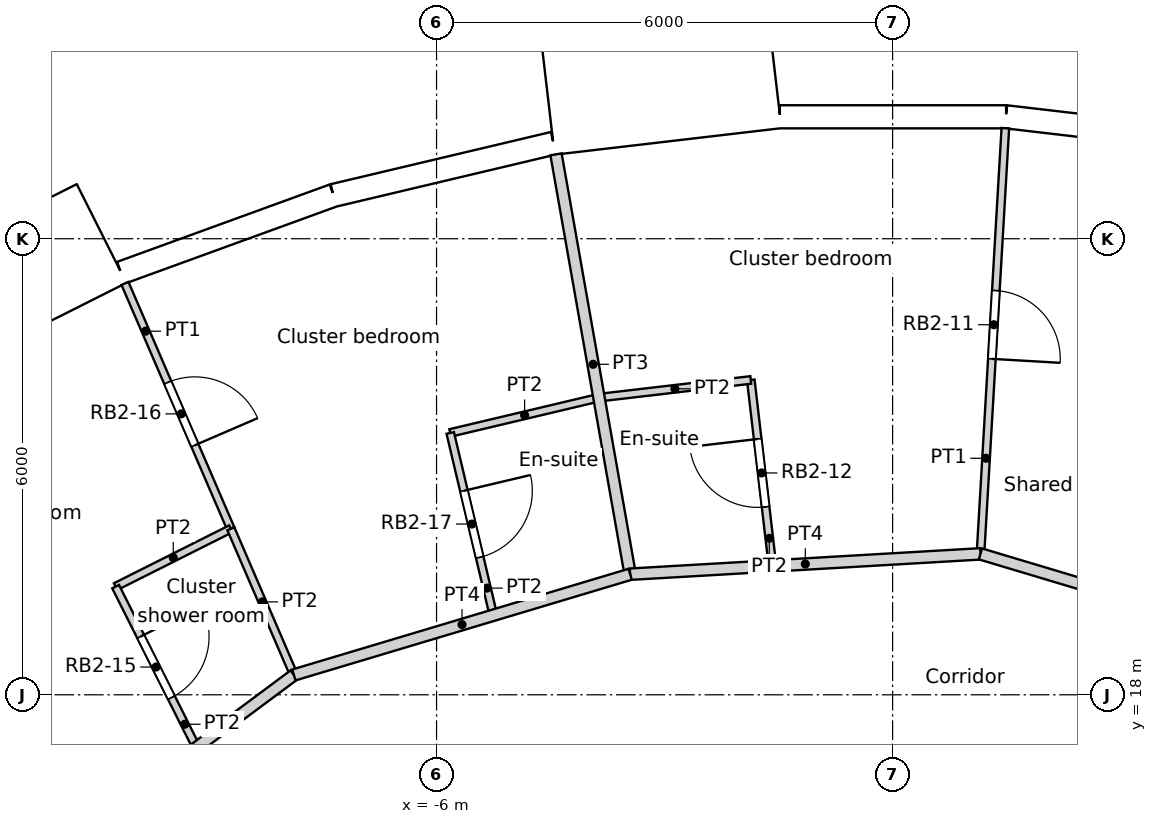
"""IFC4 building model, lengths in metres.
Left out: names, types, materials, properties, quantities, classifications, styles, units other than length and angle.
Written with IfcOpenShell. Run it as: python <this file> out.ifc"""

import sys

from ifc_helpers import new_model, si_unit, direction, frame, frame_2d, origin, origin_2d, place, context, subcontext, project, spatial, rectangle, circle, extrude, element, fill, save


model = new_model("IFC4")
c1 = context("Model", 3, precision=1e-05, world=origin(), true_north=direction((0.0, 1.0)))
c2 = subcontext(c1, "Body", "Model", "MODEL_VIEW")
j1 = project(units=[si_unit("LENGTHUNIT", "METRE"), si_unit("PLANEANGLEUNIT", "RADIAN")], contexts=[c1])
p1 = place(None, origin())
s1 = spatial("IfcSite", under=j1, at=p1, CompositionType="ELEMENT")
p2 = place(p1, origin())
s2 = spatial("IfcBuilding", under=s1, at=p2, CompositionType="ELEMENT")
p3 = place(p2, frame((0.0, 0.0, 136.8)))
s3 = spatial("IfcBuildingStorey", under=s2, at=p3, CompositionType="ELEMENT", Elevation=136.8)
for number, where, z_axis, x_axis in (
    (1, (-1.427, 24.506, 0.0), (0.0, 0.0, 1.0), (1.0, 0.0, 0.0)),
    (2, (-7.04, 23.516, 0.0), (0.0, 0.0, 1.0), (1.0, 0.0, 0.0)),
):
    element("IfcColumn", number, at=place(p3, frame(where, z_axis=z_axis, x_axis=x_axis)), inside=s3, PredefinedType="COLUMN", context=c2, shape_type="SweptSolid", body=[
        extrude(circle(Radius=0.6, at=origin_2d()), origin(), (0.0, 0.0, 1.0), 3.6),
    ])
for number, where, z_axis, x_axis in (
    (3, (1.406, 18.77, 0.0), (0.0, 0.0, 1.0), (1.0, 0.0, 0.0)),
    (4, (-4.188, 18.35, 0.0), (0.0, 0.0, 1.0), (1.0, 0.0, 0.0)),
):
    element("IfcColumn", number, at=place(p3, frame(where, z_axis=z_axis, x_axis=x_axis)), inside=s3, PredefinedType="COLUMN", context=c2, shape_type="SweptSolid", body=[
        extrude(circle(Radius=0.65, at=origin_2d()), origin(), (0.0, 0.0, 1.0), 3.6),
    ])
p4 = place(p3, frame((4.444, 25.259, 0.0), z_axis=(0.0, 0.0, 1.0), x_axis=(-0.993245010522, 0.1160359818, 0.0)))
e5 = element("IfcWall", 5, at=p4, inside=s3, PredefinedType="SOLIDWALL", context=c2, shape_type="SweptSolid", body=[
    extrude(rectangle(XDim=2.973, YDim=0.3, at=frame_2d((1.486, 0.0))), origin(), (0.0, 0.0, 1.0), 2.8),
])
p5 = place(p4, frame((1.486, 0.0, 1.55)))
e6 = element("IfcOpeningElement", 6, at=p5, cuts=e5, PredefinedType="OPENING", context=c2, shape_type="SweptSolid", body=[
    extrude(circle(Radius=0.9, at=origin_2d()), frame((0.0, 0.16, 0.0), z_axis=(0.0, -1.0, 0.0), x_axis=(1.0, 0.0, 0.0)), (0.0, 0.0, 1.0), 0.32),
])
p6 = place(p3, frame((1.491, 25.604, 0.0), z_axis=(0.0, 0.0, 1.0), x_axis=(-1.0, 0.0, 0.0)))
e7 = element("IfcWall", 7, at=p6, inside=s3, PredefinedType="SOLIDWALL", context=c2, shape_type="SweptSolid", body=[
    extrude(rectangle(XDim=2.973, YDim=0.3, at=frame_2d((1.486, 0.0))), origin(), (0.0, 0.0, 1.0), 3.3),
])
p7 = place(p6, frame((1.486, 0.0, 1.55)))
e8 = element("IfcOpeningElement", 8, at=p7, cuts=e7, PredefinedType="OPENING", context=c2, shape_type="SweptSolid", body=[
    extrude(circle(Radius=0.9, at=origin_2d()), frame((0.0, 0.16, 0.0), z_axis=(0.0, -1.0, 0.0), x_axis=(1.0, 0.0, 0.0)), (0.0, 0.0, 1.0), 0.32),
])
p8 = place(p3, frame((-1.549, 26.176, -0.3), z_axis=(0.0, 0.0, 1.0), x_axis=(-0.9932342274, -0.116128246006, 0.0)))
e9 = element("IfcWall", 9, at=p8, inside=s3, PredefinedType="ELEMENTEDWALL", context=c2, shape_type="SweptSolid", body=[
    extrude(rectangle(XDim=3.0, YDim=1.45, at=frame_2d((1.5, 0.0))), origin(), (0.0, 0.0, 1.0), 3.6),
])
p9 = place(p8, frame((1.5, 0.0, 1.85)))
e10 = element("IfcOpeningElement", 10, at=p9, cuts=e9, PredefinedType="OPENING", context=c2, shape_type="SweptSolid", body=[
    extrude(circle(Radius=0.9, at=origin_2d()), frame((0.0, 0.735, 0.0), z_axis=(0.0, -1.0, 0.0), x_axis=(1.0, 0.0, 0.0)), (0.0, 0.0, 1.0), 1.47),
])
p10 = place(p3, frame((-4.463, 25.256, 0.0), z_axis=(0.0, 0.0, 1.0), x_axis=(-0.973045378923, -0.230613725862, 0.0)))
e11 = element("IfcWall", 11, at=p10, inside=s3, PredefinedType="SOLIDWALL", context=c2, shape_type="SweptSolid", body=[
    extrude(rectangle(XDim=2.973, YDim=0.3, at=frame_2d((1.486, 0.0))), origin(), (0.0, 0.0, 1.0), 2.8),
])
p11 = place(p10, frame((1.486, 0.0, 1.55)))
e12 = element("IfcOpeningElement", 12, at=p11, cuts=e11, PredefinedType="OPENING", context=c2, shape_type="SweptSolid", body=[
    extrude(circle(Radius=0.9, at=origin_2d()), frame((0.0, 0.16, 0.0), z_axis=(0.0, -1.0, 0.0), x_axis=(1.0, 0.0, 0.0)), (0.0, 0.0, 1.0), 0.32),
])
p12 = place(p3, frame((-7.356, 24.57, 0.0), z_axis=(0.0, 0.0, 1.0), x_axis=(-0.939690282133, -0.342026568652, 0.0)))
e13 = element("IfcWall", 13, at=p12, inside=s3, PredefinedType="SOLIDWALL", context=c2, shape_type="SweptSolid", body=[
    extrude(rectangle(XDim=2.973, YDim=0.3, at=frame_2d((1.486, 0.0))), origin(), (0.0, 0.0, 1.0), 3.3),
])
p13 = place(p12, frame((1.486, 0.0, 1.55)))
e14 = element("IfcOpeningElement", 14, at=p13, cuts=e13, PredefinedType="OPENING", context=c2, shape_type="SweptSolid", body=[
    extrude(circle(Radius=0.9, at=origin_2d()), frame((0.0, 0.16, 0.0), z_axis=(0.0, -1.0, 0.0), x_axis=(1.0, 0.0, 0.0)), (0.0, 0.0, 1.0), 0.32),
])
p14 = place(p3, frame((-10.409, 24.068, -0.3), z_axis=(0.0, 0.0, 1.0), x_axis=(-0.893628249713, -0.448807922518, 0.0)))
e15 = element("IfcWall", 15, at=p14, inside=s3, PredefinedType="ELEMENTEDWALL", context=c2, shape_type="SweptSolid", body=[
    extrude(rectangle(XDim=3.0, YDim=1.45, at=frame_2d((1.5, 0.0))), origin(), (0.0, 0.0, 1.0), 3.6),
])
p15 = place(p14, frame((1.5, 0.0, 1.85)))
e16 = element("IfcOpeningElement", 16, at=p15, cuts=e15, PredefinedType="OPENING", context=c2, shape_type="SweptSolid", body=[
    extrude(circle(Radius=0.9, at=origin_2d()), frame((0.0, 0.735, 0.0), z_axis=(0.0, -1.0, 0.0), x_axis=(1.0, 0.0, 0.0)), (0.0, 0.0, 1.0), 1.47),
])
p16 = place(p3, frame((1.156, 19.853, 0.0), z_axis=(0.0, 0.0, 1.0), x_axis=(0.958024563008, -0.286686129197, 0.0)))
e17 = element("IfcWall", 17, at=p16, inside=s3, PredefinedType="PARTITIONING", context=c2, shape_type="SweptSolid", body=[
    extrude(rectangle(XDim=9.173, YDim=0.15, at=frame_2d((4.587, 0.0))), origin(), (0.0, 0.0, 1.0), 3.3),
])
p17 = place(p16, frame((3.26, 0.0, 0.0)))
e18 = element("IfcOpeningElement", 18, at=p17, cuts=e17, PredefinedType="OPENING", context=c2, shape_type="SweptSolid", body=[
    extrude(rectangle(XDim=1.1, YDim=2.1, at=frame_2d((0.55, 1.05))), frame((0.0, 0.075, 0.0), z_axis=(0.0, -1.0, 0.0), x_axis=(1.0, 0.0, 0.0)), (0.0, 0.0, 1.0), 0.15),
])
p18 = place(p3, frame((-3.453, 19.586, 0.0), z_axis=(0.0, 0.0, 1.0), x_axis=(0.998318940977, 0.057959400324, 0.0)))
e19 = element("IfcWall", 19, at=p18, inside=s3, PredefinedType="PARTITIONING", context=c2, shape_type="SweptSolid", body=[
    extrude(rectangle(XDim=4.617, YDim=0.15, at=frame_2d((2.308, 0.0))), origin(), (0.0, 0.0, 1.0), 3.3),
])
p19 = place(p3, frame((-15.235, 12.784, 0.0), z_axis=(0.0, 0.0, 1.0), x_axis=(0.802226995744, 0.597019134785, 0.0)))
e20 = element("IfcWall", 20, at=p19, inside=s3, PredefinedType="PARTITIONING", context=c2, shape_type="SweptSolid", body=[
    extrude(rectangle(XDim=9.173, YDim=0.15, at=frame_2d((4.586, 0.0))), origin(), (0.0, 0.0, 1.0), 3.3),
])
p20 = place(p19, frame((2.906, 0.0, 0.0)))
e21 = element("IfcOpeningElement", 21, at=p20, cuts=e20, PredefinedType="OPENING", context=c2, shape_type="SweptSolid", body=[
    extrude(rectangle(XDim=1.1, YDim=2.1, at=frame_2d((0.55, 1.05))), frame((0.0, 0.075, 0.0), z_axis=(0.0, -1.0, 0.0), x_axis=(1.0, 0.0, 0.0)), (0.0, 0.0, 1.0), 0.15),
])
p21 = place(p3, frame((-7.877, 18.261, 0.0), z_axis=(0.0, 0.0, 1.0), x_axis=(0.95799054752, 0.286799774863, 0.0)))
e22 = element("IfcWall", 22, at=p21, inside=s3, PredefinedType="PARTITIONING", context=c2, shape_type="SweptSolid", body=[
    extrude(rectangle(XDim=4.618, YDim=0.15, at=frame_2d((2.309, 0.0))), origin(), (0.0, 0.0, 1.0), 3.3),
])
p22 = place(p3, frame((1.156, 19.854, 0.0), z_axis=(0.0, 0.0, 1.0), x_axis=(0.058275543564, 0.998300536423, 0.0)))
e23 = element("IfcWall", 23, at=p22, inside=s3, PredefinedType="PARTITIONING", context=c2, shape_type="SweptSolid", body=[
    extrude(rectangle(XDim=5.61, YDim=0.1, at=frame_2d((2.805, 0.0))), origin(), (0.0, 0.0, 1.0), 3.3),
])
p23 = place(p22, frame((2.57, 0.0, 0.0)))
e24 = element("IfcOpeningElement", 24, at=p23, cuts=e23, PredefinedType="OPENING", context=c2, shape_type="SweptSolid", body=[
    extrude(rectangle(XDim=0.9, YDim=2.1, at=frame_2d((0.45, 1.05))), frame((0.0, 0.05, 0.0), z_axis=(0.0, -1.0, 0.0), x_axis=(1.0, 0.0, 0.0)), (0.0, 0.0, 1.0), 0.1),
])
p24 = place(p3, frame((-1.866, 22.142, 0.0), z_axis=(0.0, 0.0, 1.0), x_axis=(0.116042011614, -0.99324430607, 0.0)))
e25 = element("IfcWall", 25, at=p24, inside=s3, PredefinedType="PARTITIONING", context=c2, shape_type="SweptSolid", body=[
    extrude(rectangle(XDim=2.464, YDim=0.1, at=frame_2d((1.232, 0.0))), origin(), (0.0, 0.0, 1.0), 3.3),
])
p25 = place(p24, frame((0.782, 0.0, 0.0)))
e26 = element("IfcOpeningElement", 26, at=p25, cuts=e25, PredefinedType="OPENING", context=c2, shape_type="SweptSolid", body=[
    extrude(rectangle(XDim=0.9, YDim=2.04, at=frame_2d((0.45, 1.02))), frame((0.0, 0.05, 0.0), z_axis=(0.0, -1.0, 0.0), x_axis=(1.0, 0.0, 0.0)), (0.0, 0.0, 1.0), 0.1),
])
p26 = place(p3, frame((-3.863, 21.909, 0.0), z_axis=(0.0, 0.0, 1.0), x_axis=(0.993253818555, 0.115960561946, 0.0)))
e27 = element("IfcWall", 27, at=p26, inside=s3, PredefinedType="PARTITIONING", context=c2, shape_type="SweptSolid", body=[
    extrude(rectangle(XDim=2.011, YDim=0.1, at=frame_2d((1.005, 0.0))), origin(), (0.0, 0.0, 1.0), 3.3),
])
p27 = place(p3, frame((-4.428, 25.11, 0.0), z_axis=(0.0, 0.0, 1.0), x_axis=(0.17382754149, -0.984776109489, 0.0)))
e28 = element("IfcWall", 28, at=p27, inside=s3, PredefinedType="PARTITIONING", context=c2, shape_type="SweptSolid", body=[
    extrude(rectangle(XDim=5.61, YDim=0.15, at=frame_2d((2.805, 0.0))), origin(), (0.0, 0.0, 1.0), 3.3),
])
p28 = place(p3, frame((-10.222, 19.423, 0.0), z_axis=(0.0, 0.0, 1.0), x_axis=(0.893706346613, 0.448652388854, 0.0)))
e29 = element("IfcWall", 29, at=p28, inside=s3, PredefinedType="PARTITIONING", context=c2, shape_type="SweptSolid", body=[
    extrude(rectangle(XDim=1.696, YDim=0.1, at=frame_2d((0.848, 0.0))), origin(), (0.0, 0.0, 1.0), 3.3),
])
p29 = place(p3, frame((-10.222, 19.423, 0.0), z_axis=(0.0, 0.0, 1.0), x_axis=(0.448862306063, -0.893600934532, 0.0)))
e30 = element("IfcWall", 30, at=p29, inside=s3, PredefinedType="PARTITIONING", context=c2, shape_type="SweptSolid", body=[
    extrude(rectangle(XDim=2.368, YDim=0.1, at=frame_2d((1.184, 0.0))), origin(), (0.0, 0.0, 1.0), 3.3),
])
p30 = place(p29, frame((0.734, 0.0, 0.0)))
e31 = element("IfcOpeningElement", 31, at=p30, cuts=e30, PredefinedType="OPENING", context=c2, shape_type="SweptSolid", body=[
    extrude(rectangle(XDim=0.9, YDim=2.0, at=frame_2d((0.45, 1.0))), frame((0.0, 0.05, 0.0), z_axis=(0.0, -1.0, 0.0), x_axis=(1.0, 0.0, 0.0)), (0.0, 0.0, 1.0), 0.1),
])
p31 = place(p3, frame((-10.099, 23.412, 0.0), z_axis=(0.0, 0.0, 1.0), x_axis=(0.396231159595, -0.918150787271, 0.0)))
e32 = element("IfcWall", 32, at=p31, inside=s3, PredefinedType="PARTITIONING", context=c2, shape_type="SweptSolid", body=[
    extrude(rectangle(XDim=3.516, YDim=0.1, at=frame_2d((1.758, 0.0))), origin(), (0.0, 0.0, 1.0), 3.3),
])
p32 = place(p31, frame((1.419, 0.0, 0.0)))
e33 = element("IfcOpeningElement", 33, at=p32, cuts=e32, PredefinedType="OPENING", context=c2, shape_type="SweptSolid", body=[
    extrude(rectangle(XDim=0.9, YDim=2.1, at=frame_2d((0.45, 1.05))), frame((0.0, 0.05, 0.0), z_axis=(0.0, -1.0, 0.0), x_axis=(1.0, 0.0, 0.0)), (0.0, 0.0, 1.0), 0.1),
])
p33 = place(p3, frame((-8.706, 20.184, 0.0), z_axis=(0.0, 0.0, 1.0), x_axis=(0.395902233763, -0.918292666475, 0.0)))
e34 = element("IfcWall", 34, at=p33, inside=s3, PredefinedType="PARTITIONING", context=c2, shape_type="SweptSolid", body=[
    extrude(rectangle(XDim=2.094, YDim=0.1, at=frame_2d((1.047, 0.0))), origin(), (0.0, 0.0, 1.0), 3.3),
])
p34 = place(p3, frame((-5.82, 21.445, 0.0), z_axis=(0.0, 0.0, 1.0), x_axis=(0.973040155258, 0.230635765343, 0.0)))
e35 = element("IfcWall", 35, at=p34, inside=s3, PredefinedType="PARTITIONING", context=c2, shape_type="SweptSolid", body=[
    extrude(rectangle(XDim=2.011, YDim=0.1, at=frame_2d((1.006, 0.0))), origin(), (0.0, 0.0, 1.0), 3.3),
])
p35 = place(p3, frame((-5.82, 21.445, 0.0), z_axis=(0.0, 0.0, 1.0), x_axis=(0.230535504809, -0.973063914151, 0.0)))
e36 = element("IfcWall", 36, at=p35, inside=s3, PredefinedType="PARTITIONING", context=c2, shape_type="SweptSolid", body=[
    extrude(rectangle(XDim=2.464, YDim=0.1, at=frame_2d((1.232, 0.0))), origin(), (0.0, 0.0, 1.0), 3.3),
])
p36 = place(p35, frame((0.782, 0.0, 0.0)))
e37 = element("IfcOpeningElement", 37, at=p36, cuts=e36, PredefinedType="OPENING", context=c2, shape_type="SweptSolid", body=[
    extrude(rectangle(XDim=0.9, YDim=2.04, at=frame_2d((0.45, 1.02))), frame((0.0, 0.05, 0.0), z_axis=(0.0, -1.0, 0.0), x_axis=(1.0, 0.0, 0.0)), (0.0, 0.0, 1.0), 0.1),
])
p37 = place(p5, origin())
e38 = element("IfcWindow", 38, at=p37, inside=s3, PartitioningType="SINGLE_PANEL", PredefinedType="WINDOW", context=c2, shape_type="SweptSolid", body=[
    extrude(circle(Radius=0.9, at=origin_2d()), frame((0.0, 0.12, 0.0), z_axis=(0.0, -1.0, 0.0), x_axis=(1.0, 0.0, 0.0)), (0.0, 0.0, 1.0), 0.1),
])
fill(e6, e38)
p38 = place(p7, origin())
e39 = element("IfcWindow", 39, at=p38, inside=s3, PartitioningType="SINGLE_PANEL", PredefinedType="WINDOW", context=c2, shape_type="SweptSolid", body=[
    extrude(circle(Radius=0.9, at=origin_2d()), frame((0.0, 0.12, 0.0), z_axis=(0.0, -1.0, 0.0), x_axis=(1.0, 0.0, 0.0)), (0.0, 0.0, 1.0), 0.1),
])
fill(e8, e39)
p39 = place(p9, origin())
e40 = element("IfcWindow", 40, at=p39, inside=s3, PartitioningType="SINGLE_PANEL", PredefinedType="WINDOW", context=c2, shape_type="SweptSolid", body=[
    extrude(circle(Radius=0.9, at=origin_2d()), frame((0.0, 0.695, 0.0), z_axis=(0.0, -1.0, 0.0), x_axis=(1.0, 0.0, 0.0)), (0.0, 0.0, 1.0), 0.1),
])
fill(e10, e40)
p40 = place(p11, origin())
e41 = element("IfcWindow", 41, at=p40, inside=s3, PartitioningType="SINGLE_PANEL", PredefinedType="WINDOW", context=c2, shape_type="SweptSolid", body=[
    extrude(circle(Radius=0.9, at=origin_2d()), frame((0.0, 0.12, 0.0), z_axis=(0.0, -1.0, 0.0), x_axis=(1.0, 0.0, 0.0)), (0.0, 0.0, 1.0), 0.1),
])
fill(e12, e41)
p41 = place(p13, origin())
e42 = element("IfcWindow", 42, at=p41, inside=s3, PartitioningType="SINGLE_PANEL", PredefinedType="WINDOW", context=c2, shape_type="SweptSolid", body=[
    extrude(circle(Radius=0.9, at=origin_2d()), frame((0.0, 0.12, 0.0), z_axis=(0.0, -1.0, 0.0), x_axis=(1.0, 0.0, 0.0)), (0.0, 0.0, 1.0), 0.1),
])
fill(e14, e42)
p42 = place(p15, origin())
e43 = element("IfcWindow", 43, at=p42, inside=s3, PartitioningType="SINGLE_PANEL", PredefinedType="WINDOW", context=c2, shape_type="SweptSolid", body=[
    extrude(circle(Radius=0.9, at=origin_2d()), frame((0.0, 0.695, 0.0), z_axis=(0.0, -1.0, 0.0), x_axis=(1.0, 0.0, 0.0)), (0.0, 0.0, 1.0), 0.1),
])
fill(e16, e43)
p43 = place(p23, origin())
e44 = element("IfcDoor", 44, at=p43, inside=s3, OperationType="SINGLE_SWING_RIGHT", PredefinedType="DOOR", context=c2, shape_type="SweptSolid", body=[
    extrude(rectangle(XDim=0.9, YDim=2.1, at=frame_2d((0.45, 1.05))), frame((0.0, 0.025, 0.0), z_axis=(0.0, -1.0, 0.0), x_axis=(1.0, 0.0, 0.0)), (0.0, 0.0, 1.0), 0.05),
])
fill(e24, e44)
p44 = place(p25, origin())
e45 = element("IfcDoor", 45, at=p44, inside=s3, OperationType="SINGLE_SWING_RIGHT", PredefinedType="DOOR", context=c2, shape_type="SweptSolid", body=[
    extrude(rectangle(XDim=0.9, YDim=2.04, at=frame_2d((0.45, 1.02))), frame((0.0, 0.025, 0.0), z_axis=(0.0, -1.0, 0.0), x_axis=(1.0, 0.0, 0.0)), (0.0, 0.0, 1.0), 0.05),
])
fill(e26, e45)
p45 = place(p30, origin())
e46 = element("IfcDoor", 46, at=p45, inside=s3, OperationType="SINGLE_SWING_LEFT", PredefinedType="DOOR", context=c2, shape_type="SweptSolid", body=[
    extrude(rectangle(XDim=0.9, YDim=2.0, at=frame_2d((0.45, 1.0))), frame((0.0, 0.025, 0.0), z_axis=(0.0, -1.0, 0.0), x_axis=(1.0, 0.0, 0.0)), (0.0, 0.0, 1.0), 0.05),
])
fill(e31, e46)
p46 = place(p32, origin())
e47 = element("IfcDoor", 47, at=p46, inside=s3, OperationType="SINGLE_SWING_RIGHT", PredefinedType="DOOR", context=c2, shape_type="SweptSolid", body=[
    extrude(rectangle(XDim=0.9, YDim=2.1, at=frame_2d((0.45, 1.05))), frame((0.0, 0.025, 0.0), z_axis=(0.0, -1.0, 0.0), x_axis=(1.0, 0.0, 0.0)), (0.0, 0.0, 1.0), 0.05),
])
fill(e33, e47)
p47 = place(p36, origin())
e48 = element("IfcDoor", 48, at=p47, inside=s3, OperationType="SINGLE_SWING_LEFT", PredefinedType="DOOR", context=c2, shape_type="SweptSolid", body=[
    extrude(rectangle(XDim=0.9, YDim=2.04, at=frame_2d((0.45, 1.02))), frame((0.0, 0.025, 0.0), z_axis=(0.0, -1.0, 0.0), x_axis=(1.0, 0.0, 0.0)), (0.0, 0.0, 1.0), 0.05),
])
fill(e37, e48)
save(model, sys.argv[1])
